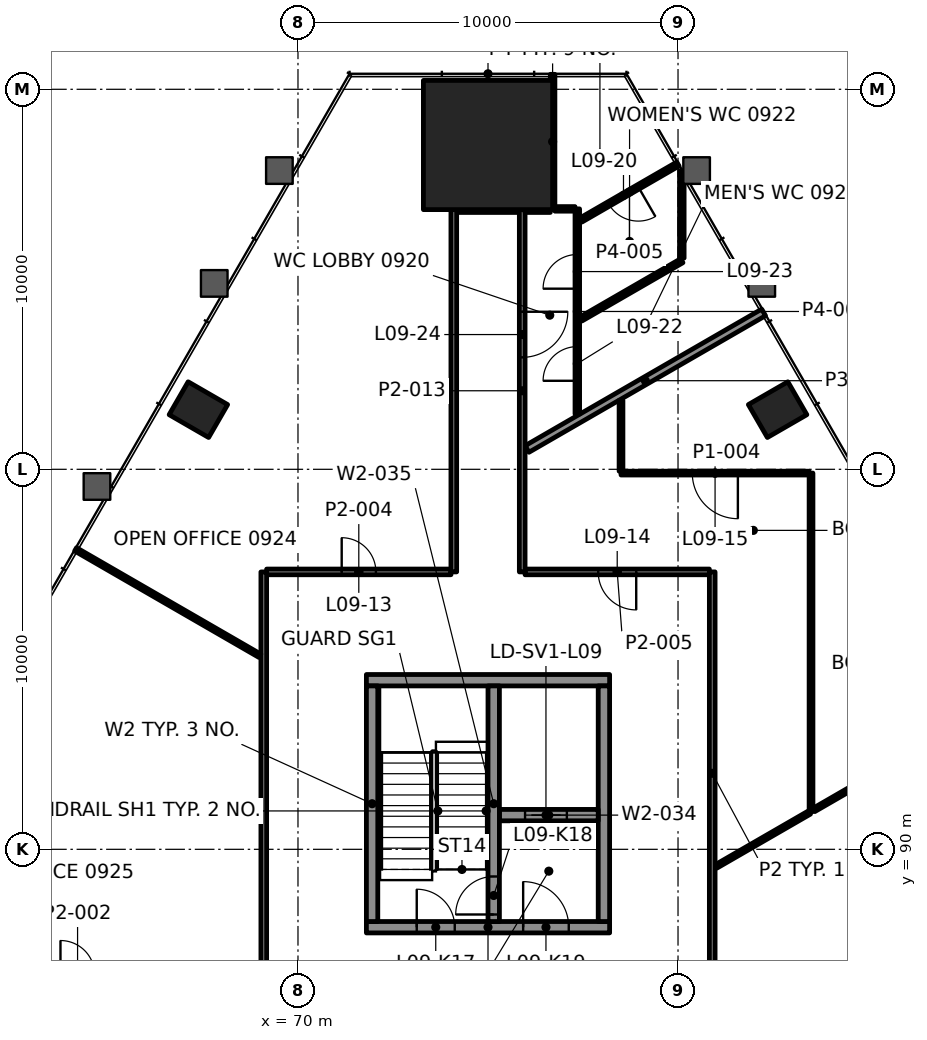
"""IFC4 building model, lengths in metres.
Left out: names, types, materials, properties, quantities, classifications, styles, units other than length and angle.
Written with IfcOpenShell. Run it as: python <this file> out.ifc"""

import sys

from ifc_helpers import new_model, si_unit, direction, frame, frame_2d, origin, origin_2d, place, context, subcontext, project, spatial, rectangle, extrude, element, fill, save


model = new_model("IFC4")
c1 = context("Model", 3, precision=1e-05, world=origin(), true_north=direction((0.0, 1.0)))
c2 = subcontext(c1, "Body", "Model", "MODEL_VIEW")
j1 = project(units=[si_unit("LENGTHUNIT", "METRE"), si_unit("PLANEANGLEUNIT", "RADIAN")], contexts=[c1])
p1 = place(None, origin())
s1 = spatial("IfcSite", under=j1, at=p1, CompositionType="ELEMENT")
p2 = place(p1, origin())
s2 = spatial("IfcBuilding", under=s1, at=p2, CompositionType="ELEMENT")
p3 = place(p2, frame((0.0, 0.0, 44.2)))
s3 = spatial("IfcBuildingStorey", under=s2, at=p3, CompositionType="ELEMENT", Elevation=44.2)
p4 = place(p3, frame((75.0, 108.534, 0.0), z_axis=(0.0, 0.0, 1.0), x_axis=(-1.0, 0.0, 0.0)))
e1 = element("IfcColumn", 1, at=p4, inside=s3, PredefinedType="COLUMN", context=c2, shape_type="SweptSolid", body=[
    extrude(rectangle(XDim=3.4, YDim=3.4, at=origin_2d()), origin(), (0.0, 0.0, 1.0), 4.2),
])
for number, where, z_axis, x_axis in (
    (2, (82.621, 101.57, -0.0), (0.0, 0.0, 1.0), (-0.5, 0.866, 0.0)),
    (3, (67.379, 101.57, -0.0), (0.0, 0.0, 1.0), (-0.5, -0.866, 0.0)),
):
    element("IfcColumn", number, at=place(p3, frame(where, z_axis=z_axis, x_axis=x_axis)), inside=s3, PredefinedType="COLUMN", context=c2, shape_type="SweptSolid", body=[
        extrude(rectangle(XDim=1.0, YDim=1.2, at=origin_2d()), origin(), (0.0, 0.0, 1.0), 4.2),
    ])
p5 = place(p3, frame((71.8, 87.95, 0.0), z_axis=(0.0, 0.0, 1.0), x_axis=(1.0, 0.0, 0.0)))
e4 = element("IfcWall", 4, at=p5, inside=s3, PredefinedType="SHEAR", context=c2, shape_type="SweptSolid", body=[
    extrude(rectangle(XDim=6.4, YDim=0.3, at=frame_2d((3.2, 0.0))), origin(), (0.0, 0.0, 1.0), 4.0),
])
p6 = place(p5, frame((1.325, 0.0, 0.0)))
e5 = element("IfcOpeningElement", 5, at=p6, cuts=e4, PredefinedType="OPENING", context=c2, shape_type="SweptSolid", body=[
    extrude(rectangle(XDim=1.0, YDim=2.1, at=frame_2d((0.5, 1.05))), frame((0.0, 0.16, 0.0), z_axis=(0.0, -1.0, 0.0), x_axis=(1.0, 0.0, 0.0)), (0.0, 0.0, 1.0), 0.32),
])
p7 = place(p5, frame((4.125, 0.0, 0.0)))
e6 = element("IfcOpeningElement", 6, at=p7, cuts=e4, PredefinedType="OPENING", context=c2, shape_type="SweptSolid", body=[
    extrude(rectangle(XDim=1.2, YDim=2.1, at=frame_2d((0.6, 1.05))), frame((0.0, 0.16, 0.0), z_axis=(0.0, -1.0, 0.0), x_axis=(1.0, 0.0, 0.0)), (0.0, 0.0, 1.0), 0.32),
])
p8 = place(p3, frame((71.8, 94.45, 0.0), z_axis=(0.0, 0.0, 1.0), x_axis=(1.0, 0.0, 0.0)))
e7 = element("IfcWall", 7, at=p8, inside=s3, PredefinedType="SHEAR", context=c2, shape_type="SweptSolid", body=[
    extrude(rectangle(XDim=6.4, YDim=0.3, at=frame_2d((3.2, 0.0))), origin(), (0.0, 0.0, 1.0), 4.0),
])
for number, where, z_axis, x_axis in (
    (8, (71.95, 88.1, 0.0), (0.0, 0.0, 1.0), (0.0, 1.0, 0.0)),
    (9, (78.05, 88.1, 0.0), (0.0, 0.0, 1.0), (0.0, 1.0, 0.0)),
):
    element("IfcWall", number, at=place(p3, frame(where, z_axis=z_axis, x_axis=x_axis)), inside=s3, PredefinedType="SHEAR", context=c2, shape_type="SweptSolid", body=[
        extrude(rectangle(XDim=6.2, YDim=0.3, at=frame_2d((3.1, 0.0))), origin(), (0.0, 0.0, 1.0), 4.0),
    ])
p9 = place(p3, frame((75.3, 90.9, 0.0), z_axis=(0.0, 0.0, 1.0), x_axis=(1.0, 0.0, 0.0)))
e10 = element("IfcWall", 10, at=p9, inside=s3, PredefinedType="SHEAR", context=c2, shape_type="SweptSolid", body=[
    extrude(rectangle(XDim=2.6, YDim=0.3, at=frame_2d((1.3, 0.0))), origin(), (0.0, 0.0, 1.0), 4.0),
])
p10 = place(p9, frame((0.675, 0.0, 0.0)))
e11 = element("IfcOpeningElement", 11, at=p10, cuts=e10, PredefinedType="OPENING", context=c2, shape_type="SweptSolid", body=[
    extrude(rectangle(XDim=1.1, YDim=2.1, at=frame_2d((0.55, 1.05))), frame((0.0, 0.16, 0.0), z_axis=(0.0, -1.0, 0.0), x_axis=(1.0, 0.0, 0.0)), (0.0, 0.0, 1.0), 0.32),
])
p11 = place(p3, frame((75.15, 88.1, 0.0), z_axis=(0.0, 0.0, 1.0), x_axis=(0.0, 1.0, 0.0)))
e12 = element("IfcWall", 12, at=p11, inside=s3, PredefinedType="SHEAR", context=c2, shape_type="SweptSolid", body=[
    extrude(rectangle(XDim=6.2, YDim=0.3, at=frame_2d((3.1, 0.0))), origin(), (0.0, 0.0, 1.0), 4.0),
])
p12 = place(p11, frame((0.185, 0.0, 0.0)))
e13 = element("IfcOpeningElement", 13, at=p12, cuts=e12, PredefinedType="OPENING", context=c2, shape_type="SweptSolid", body=[
    extrude(rectangle(XDim=1.0, YDim=2.1, at=frame_2d((0.5, 1.05))), frame((0.0, 0.16, 0.0), z_axis=(0.0, -1.0, 0.0), x_axis=(1.0, 0.0, 0.0)), (0.0, 0.0, 1.0), 0.32),
])
p13 = place(p3, frame((69.176, 97.3, 0.0), z_axis=(0.0, 0.0, 1.0), x_axis=(1.0, 0.0, 0.0)))
e14 = element("IfcWall", 14, at=p13, inside=s3, PredefinedType="PARTITIONING", context=c2, shape_type="SweptSolid", body=[
    extrude(rectangle(XDim=4.849, YDim=0.15, at=frame_2d((2.425, 0.0))), origin(), (0.0, 0.0, 1.0), 3.4),
])
p14 = place(p13, frame((1.975, 0.0, 0.0)))
e15 = element("IfcOpeningElement", 15, at=p14, cuts=e14, PredefinedType="OPENING", context=c2, shape_type="SweptSolid", body=[
    extrude(rectangle(XDim=0.9, YDim=2.1, at=frame_2d((0.45, 1.05))), frame((0.0, 0.085, 0.0), z_axis=(0.0, -1.0, 0.0), x_axis=(1.0, 0.0, 0.0)), (0.0, 0.0, 1.0), 0.17),
])
p15 = place(p3, frame((80.825, 97.3, 0.0), z_axis=(0.0, 0.0, 1.0), x_axis=(-1.0, 0.0, 0.0)))
e16 = element("IfcWall", 16, at=p15, inside=s3, PredefinedType="PARTITIONING", context=c2, shape_type="SweptSolid", body=[
    extrude(rectangle(XDim=4.85, YDim=0.15, at=frame_2d((2.425, 0.0))), origin(), (0.0, 0.0, 1.0), 3.4),
])
p16 = place(p15, frame((1.925, 0.0, 0.0)))
e17 = element("IfcOpeningElement", 17, at=p16, cuts=e16, PredefinedType="OPENING", context=c2, shape_type="SweptSolid", body=[
    extrude(rectangle(XDim=1.0, YDim=2.1, at=frame_2d((0.5, 1.05))), frame((0.0, 0.085, 0.0), z_axis=(0.0, -1.0, 0.0), x_axis=(1.0, 0.0, 0.0)), (0.0, 0.0, 1.0), 0.17),
])
p17 = place(p3, frame((83.45, 99.9, 0.0), z_axis=(0.0, 0.0, 1.0), x_axis=(-1.0, 0.0, 0.0)))
e18 = element("IfcWall", 18, at=p17, inside=s3, PredefinedType="PARTITIONING", context=c2, shape_type="SweptSolid", body=[
    extrude(rectangle(XDim=4.95, YDim=0.1, at=frame_2d((2.475, 0.0))), origin(), (0.0, 0.0, 1.0), 3.165),
])
p18 = place(p17, frame((1.875, 0.0, 0.0)))
e19 = element("IfcOpeningElement", 19, at=p18, cuts=e18, PredefinedType="OPENING", context=c2, shape_type="SweptSolid", body=[
    extrude(rectangle(XDim=1.2, YDim=2.1, at=frame_2d((0.6, 1.05))), frame((0.0, 0.06, 0.0), z_axis=(0.0, -1.0, 0.0), x_axis=(1.0, 0.0, 0.0)), (0.0, 0.0, 1.0), 0.12),
])
p19 = place(p3, frame((74.176, 106.834, 0.0), z_axis=(0.0, 0.0, 1.0), x_axis=(1.0, 0.0, 0.0)))
e20 = element("IfcWall", 20, at=p19, inside=s3, PredefinedType="PARTITIONING", context=c2, shape_type="SweptSolid", body=[
    extrude(rectangle(XDim=1.649, YDim=0.15, at=frame_2d((0.825, 0.0))), origin(), (0.0, 0.0, 1.0), 3.397),
])
p20 = place(p3, frame((76.76, 106.853, 0.0), z_axis=(0.0, 0.0, 1.0), x_axis=(1.0, 0.0, 0.0)))
e21 = element("IfcWall", 21, at=p20, inside=s3, PredefinedType="PARTITIONING", context=c2, shape_type="SweptSolid", body=[
    extrude(rectangle(XDim=0.53, YDim=0.12, at=frame_2d((0.265, 0.0))), origin(), (0.0, 0.0, 1.0), 3.4),
])
p21 = place(p3, frame((81.001, 89.55, 0.0), z_axis=(0.0, 0.0, 1.0), x_axis=(0.866019653938, 0.500009958894, 0.0)))
e22 = element("IfcWall", 22, at=p21, inside=s3, PredefinedType="PARTITIONING", context=c2, shape_type="SweptSolid", body=[
    extrude(rectangle(XDim=2.842, YDim=0.1, at=frame_2d((1.421, 0.0))), origin(), (0.0, 0.0, 1.0), 3.4),
])
p22 = place(p3, frame((76.027, 100.534, 0.0), z_axis=(0.0, 0.0, 1.0), x_axis=(0.866029480033, 0.499992939664, 0.0)))
e23 = element("IfcWall", 23, at=p22, inside=s3, PredefinedType="PARTITIONING", context=c2, shape_type="SweptSolid", body=[
    extrude(rectangle(XDim=7.188, YDim=0.2, at=frame_2d((3.594, 0.0))), origin(), (0.0, 0.0, 1.0), 3.4),
])
p23 = place(p3, frame((77.445, 103.956, 0.0), z_axis=(0.0, 0.0, 1.0), x_axis=(0.86599994119, 0.500044099915, 0.0)))
e24 = element("IfcWall", 24, at=p23, inside=s3, PredefinedType="PARTITIONING", context=c2, shape_type="SweptSolid", body=[
    extrude(rectangle(XDim=3.066, YDim=0.12, at=frame_2d((1.533, 0.0))), origin(), (0.0, 0.0, 1.0), 3.4),
])
p24 = place(p3, frame((79.997, 108.033, 0.0), z_axis=(0.0, 0.0, 1.0), x_axis=(-0.866038018385, -0.499978150234, 0.0)))
e25 = element("IfcWall", 25, at=p24, inside=s3, PredefinedType="PARTITIONING", context=c2, shape_type="SweptSolid", body=[
    extrude(rectangle(XDim=2.948, YDim=0.12, at=frame_2d((1.474, 0.0))), origin(), (0.0, 0.0, 1.0), 3.4),
])
p25 = place(p24, frame((1.204, 0.0, 0.0)))
e26 = element("IfcOpeningElement", 26, at=p25, cuts=e25, PredefinedType="OPENING", context=c2, shape_type="SweptSolid", body=[
    extrude(rectangle(XDim=0.9, YDim=2.1, at=frame_2d((0.45, 1.05))), frame((0.0, 0.07, 0.0), z_axis=(0.0, -1.0, 0.0), x_axis=(1.0, 0.0, 0.0)), (0.0, 0.0, 1.0), 0.14),
])
p26 = place(p3, frame((83.5, 90.993, 0.0), z_axis=(0.0, 0.0, 1.0), x_axis=(0.0, 1.0, 0.0)))
e27 = element("IfcWall", 27, at=p26, inside=s3, PredefinedType="PARTITIONING", context=c2, shape_type="SweptSolid", body=[
    extrude(rectangle(XDim=8.907, YDim=0.1, at=frame_2d((4.454, 0.0))), origin(), (0.0, 0.0, 1.0), 3.165),
])
p27 = place(p3, frame((80.9, 86.7, 0.0), z_axis=(0.0, 0.0, 1.0), x_axis=(0.0, 1.0, 0.0)))
e28 = element("IfcWall", 28, at=p27, inside=s3, PredefinedType="PARTITIONING", context=c2, shape_type="SweptSolid", body=[
    extrude(rectangle(XDim=10.6, YDim=0.15, at=frame_2d((5.3, 0.0))), origin(), (0.0, 0.0, 1.0), 3.4),
])
p28 = place(p3, frame((80.1, 105.558, 0.0), z_axis=(0.0, 0.0, 1.0), x_axis=(0.0, 1.0, 0.0)))
e29 = element("IfcWall", 29, at=p28, inside=s3, PredefinedType="PARTITIONING", context=c2, shape_type="SweptSolid", body=[
    extrude(rectangle(XDim=2.297, YDim=0.12, at=frame_2d((1.149, 0.0))), origin(), (0.0, 0.0, 1.0), 3.4),
])
p29 = place(p3, frame((78.5, 99.95, 0.0), z_axis=(0.0, 0.0, 1.0), x_axis=(0.0, 1.0, 0.0)))
e30 = element("IfcWall", 30, at=p29, inside=s3, PredefinedType="PARTITIONING", context=c2, shape_type="SweptSolid", body=[
    extrude(rectangle(XDim=1.867, YDim=0.1, at=frame_2d((0.934, 0.0))), origin(), (0.0, 0.0, 1.0), 3.4),
])
p30 = place(p3, frame((77.35, 101.454, 0.0), z_axis=(0.0, 0.0, 1.0), x_axis=(0.0, 1.0, 0.0)))
e31 = element("IfcWall", 31, at=p30, inside=s3, PredefinedType="PARTITIONING", context=c2, shape_type="SweptSolid", body=[
    extrude(rectangle(XDim=5.399, YDim=0.12, at=frame_2d((2.699, 0.0))), origin(), (0.0, 0.0, 1.0), 3.4),
])
p31 = place(p30, frame((0.875, 0.0, 0.0)))
e32 = element("IfcOpeningElement", 32, at=p31, cuts=e31, PredefinedType="OPENING", context=c2, shape_type="SweptSolid", body=[
    extrude(rectangle(XDim=0.9, YDim=2.1, at=frame_2d((0.45, 1.05))), frame((0.0, 0.07, 0.0), z_axis=(0.0, -1.0, 0.0), x_axis=(1.0, 0.0, 0.0)), (0.0, 0.0, 1.0), 0.14),
])
p32 = place(p30, frame((3.299, 0.0, 0.0)))
e33 = element("IfcOpeningElement", 33, at=p32, cuts=e31, PredefinedType="OPENING", context=c2, shape_type="SweptSolid", body=[
    extrude(rectangle(XDim=0.9, YDim=2.1, at=frame_2d((0.45, 1.05))), frame((0.0, 0.07, 0.0), z_axis=(0.0, -1.0, 0.0), x_axis=(1.0, 0.0, 0.0)), (0.0, 0.0, 1.0), 0.14),
])
p33 = place(p3, frame((76.7, 106.85, 0.0), z_axis=(0.0, 0.0, 1.0), x_axis=(0.0, 1.0, 0.0)))
e34 = element("IfcWall", 34, at=p33, inside=s3, PredefinedType="PARTITIONING", context=c2, shape_type="SweptSolid", body=[
    extrude(rectangle(XDim=3.543, YDim=0.12, at=frame_2d((1.772, 0.0))), origin(), (0.0, 0.0, 1.0), 3.4),
])
p34 = place(p3, frame((75.9, 106.834, 0.0), z_axis=(0.0, 0.0, 1.0), x_axis=(0.0, -1.0, 0.0)))
e35 = element("IfcWall", 35, at=p34, inside=s3, PredefinedType="PARTITIONING", context=c2, shape_type="SweptSolid", body=[
    extrude(rectangle(XDim=9.534, YDim=0.15, at=frame_2d((4.767, 0.0))), origin(), (0.0, 0.0, 1.0), 3.4),
])
p35 = place(p34, frame((2.688, 0.0, 0.0)))
e36 = element("IfcOpeningElement", 36, at=p35, cuts=e35, PredefinedType="OPENING", context=c2, shape_type="SweptSolid", body=[
    extrude(rectangle(XDim=1.2, YDim=2.1, at=frame_2d((0.6, 1.05))), frame((0.0, 0.085, 0.0), z_axis=(0.0, -1.0, 0.0), x_axis=(1.0, 0.0, 0.0)), (0.0, 0.0, 1.0), 0.17),
])
p36 = place(p3, frame((74.1, 97.3, 0.0), z_axis=(0.0, 0.0, 1.0), x_axis=(0.0, 1.0, 0.0)))
e37 = element("IfcWall", 37, at=p36, inside=s3, PredefinedType="PARTITIONING", context=c2, shape_type="SweptSolid", body=[
    extrude(rectangle(XDim=9.533, YDim=0.15, at=frame_2d((4.767, 0.0))), origin(), (0.0, 0.0, 1.0), 3.4),
])
p37 = place(p3, frame((69.1, 86.7, 0.0), z_axis=(0.0, 0.0, 1.0), x_axis=(0.0, 1.0, 0.0)))
e38 = element("IfcWall", 38, at=p37, inside=s3, PredefinedType="PARTITIONING", context=c2, shape_type="SweptSolid", body=[
    extrude(rectangle(XDim=10.6, YDim=0.15, at=frame_2d((5.3, 0.0))), origin(), (0.0, 0.0, 1.0), 3.4),
])
p38 = place(p3, frame((68.999, 95.093, 0.0), z_axis=(0.0, 0.0, 1.0), x_axis=(-0.866032434152, 0.499987822848, 0.0)))
e39 = element("IfcWall", 39, at=p38, inside=s3, PredefinedType="PARTITIONING", context=c2, shape_type="SweptSolid", body=[
    extrude(rectangle(XDim=5.601, YDim=0.1, at=frame_2d((2.801, 0.0))), origin(), (0.0, 0.0, 1.0), 3.165),
])
p39 = place(p3, frame((75.975, 106.834, 0.0), z_axis=(0.0, 0.0, 1.0), x_axis=(1.0, 0.0, 0.0)))
e40 = element("IfcWall", 40, at=p39, inside=s3, PredefinedType="PARTITIONING", context=c2, shape_type="SweptSolid", body=[
    extrude(rectangle(XDim=0.664, YDim=0.15, at=frame_2d((0.332, 0.0))), origin(), (0.0, 0.0, 1.0), 3.4),
])
p40 = place(p3, frame((83.575, 91.036, 0.0), z_axis=(0.0, 0.0, 1.0), x_axis=(0.866032607753, 0.499987522153, 0.0)))
e41 = element("IfcWall", 41, at=p40, inside=s3, PredefinedType="PARTITIONING", context=c2, shape_type="SweptSolid", body=[
    extrude(rectangle(XDim=3.8, YDim=0.1, at=frame_2d((1.9, 0.0))), origin(), (0.0, 0.0, 1.0), 3.4),
])
p41 = place(p14, origin())
e42 = element("IfcDoor", 42, at=p41, inside=s3, OperationType="SINGLE_SWING_LEFT", PredefinedType="DOOR", context=c2, shape_type="SweptSolid", body=[
    extrude(rectangle(XDim=0.9, YDim=2.1, at=frame_2d((0.45, 1.05))), frame((0.0, 0.025, 0.0), z_axis=(0.0, -1.0, 0.0), x_axis=(1.0, 0.0, 0.0)), (0.0, 0.0, 1.0), 0.05),
])
fill(e15, e42)
p42 = place(p16, origin())
e43 = element("IfcDoor", 43, at=p42, inside=s3, OperationType="SINGLE_SWING_LEFT", PredefinedType="DOOR", context=c2, shape_type="SweptSolid", body=[
    extrude(rectangle(XDim=1.0, YDim=2.1, at=frame_2d((0.5, 1.05))), frame((0.0, 0.025, 0.0), z_axis=(0.0, -1.0, 0.0), x_axis=(1.0, 0.0, 0.0)), (0.0, 0.0, 1.0), 0.05),
])
fill(e17, e43)
p43 = place(p18, origin())
e44 = element("IfcDoor", 44, at=p43, inside=s3, OperationType="DOUBLE_DOOR_SINGLE_SWING", PredefinedType="DOOR", context=c2, shape_type="SweptSolid", body=[
    extrude(rectangle(XDim=1.2, YDim=2.1, at=frame_2d((0.6, 1.05))), frame((0.0, 0.025, 0.0), z_axis=(0.0, -1.0, 0.0), x_axis=(1.0, 0.0, 0.0)), (0.0, 0.0, 1.0), 0.05),
])
fill(e19, e44)
p44 = place(p25, origin())
e45 = element("IfcDoor", 45, at=p44, inside=s3, OperationType="SINGLE_SWING_LEFT", PredefinedType="DOOR", context=c2, shape_type="SweptSolid", body=[
    extrude(rectangle(XDim=0.9, YDim=2.1, at=frame_2d((0.45, 1.05))), frame((0.0, 0.025, 0.0), z_axis=(0.0, -1.0, 0.0), x_axis=(1.0, 0.0, 0.0)), (0.0, 0.0, 1.0), 0.05),
])
fill(e26, e45)
p45 = place(p31, origin())
e46 = element("IfcDoor", 46, at=p45, inside=s3, OperationType="SINGLE_SWING_RIGHT", PredefinedType="DOOR", context=c2, shape_type="SweptSolid", body=[
    extrude(rectangle(XDim=0.9, YDim=2.1, at=frame_2d((0.45, 1.05))), frame((0.0, 0.025, 0.0), z_axis=(0.0, -1.0, 0.0), x_axis=(1.0, 0.0, 0.0)), (0.0, 0.0, 1.0), 0.05),
])
fill(e32, e46)
p46 = place(p32, origin())
e47 = element("IfcDoor", 47, at=p46, inside=s3, OperationType="SINGLE_SWING_LEFT", PredefinedType="DOOR", context=c2, shape_type="SweptSolid", body=[
    extrude(rectangle(XDim=0.9, YDim=2.1, at=frame_2d((0.45, 1.05))), frame((0.0, 0.025, 0.0), z_axis=(0.0, -1.0, 0.0), x_axis=(1.0, 0.0, 0.0)), (0.0, 0.0, 1.0), 0.05),
])
fill(e33, e47)
p47 = place(p35, origin())
e48 = element("IfcDoor", 48, at=p47, inside=s3, OperationType="DOUBLE_DOOR_SINGLE_SWING", PredefinedType="DOOR", context=c2, shape_type="SweptSolid", body=[
    extrude(rectangle(XDim=1.2, YDim=2.1, at=frame_2d((0.6, 1.05))), frame((0.0, 0.025, 0.0), z_axis=(0.0, -1.0, 0.0), x_axis=(1.0, 0.0, 0.0)), (0.0, 0.0, 1.0), 0.05),
])
fill(e36, e48)
p48 = place(p10, origin())
e49 = element("IfcDoor", 49, at=p48, inside=s3, OperationType="DOUBLE_DOOR_SLIDING", PredefinedType="DOOR", context=c2, shape_type="SweptSolid", body=[
    extrude(rectangle(XDim=1.1, YDim=2.1, at=frame_2d((0.55, 1.05))), frame((0.0, 0.025, 0.0), z_axis=(0.0, -1.0, 0.0), x_axis=(1.0, 0.0, 0.0)), (0.0, 0.0, 1.0), 0.05),
])
fill(e11, e49)
p49 = place(p6, origin())
e50 = element("IfcDoor", 50, at=p49, inside=s3, OperationType="SINGLE_SWING_RIGHT", PredefinedType="DOOR", context=c2, shape_type="SweptSolid", body=[
    extrude(rectangle(XDim=1.0, YDim=2.1, at=frame_2d((0.5, 1.05))), frame((0.0, 0.025, 0.0), z_axis=(0.0, -1.0, 0.0), x_axis=(1.0, 0.0, 0.0)), (0.0, 0.0, 1.0), 0.05),
])
fill(e5, e50)
p50 = place(p12, origin())
e51 = element("IfcDoor", 51, at=p50, inside=s3, OperationType="SINGLE_SWING_LEFT", PredefinedType="DOOR", context=c2, shape_type="SweptSolid", body=[
    extrude(rectangle(XDim=1.0, YDim=2.1, at=frame_2d((0.5, 1.05))), frame((0.0, 0.025, 0.0), z_axis=(0.0, -1.0, 0.0), x_axis=(1.0, 0.0, 0.0)), (0.0, 0.0, 1.0), 0.05),
])
fill(e13, e51)
p51 = place(p7, origin())
e52 = element("IfcDoor", 52, at=p51, inside=s3, OperationType="SINGLE_SWING_RIGHT", PredefinedType="DOOR", context=c2, shape_type="SweptSolid", body=[
    extrude(rectangle(XDim=1.2, YDim=2.1, at=frame_2d((0.6, 1.05))), frame((0.0, 0.025, 0.0), z_axis=(0.0, -1.0, 0.0), x_axis=(1.0, 0.0, 0.0)), (0.0, 0.0, 1.0), 0.05),
])
fill(e6, e52)
save(model, sys.argv[1])
